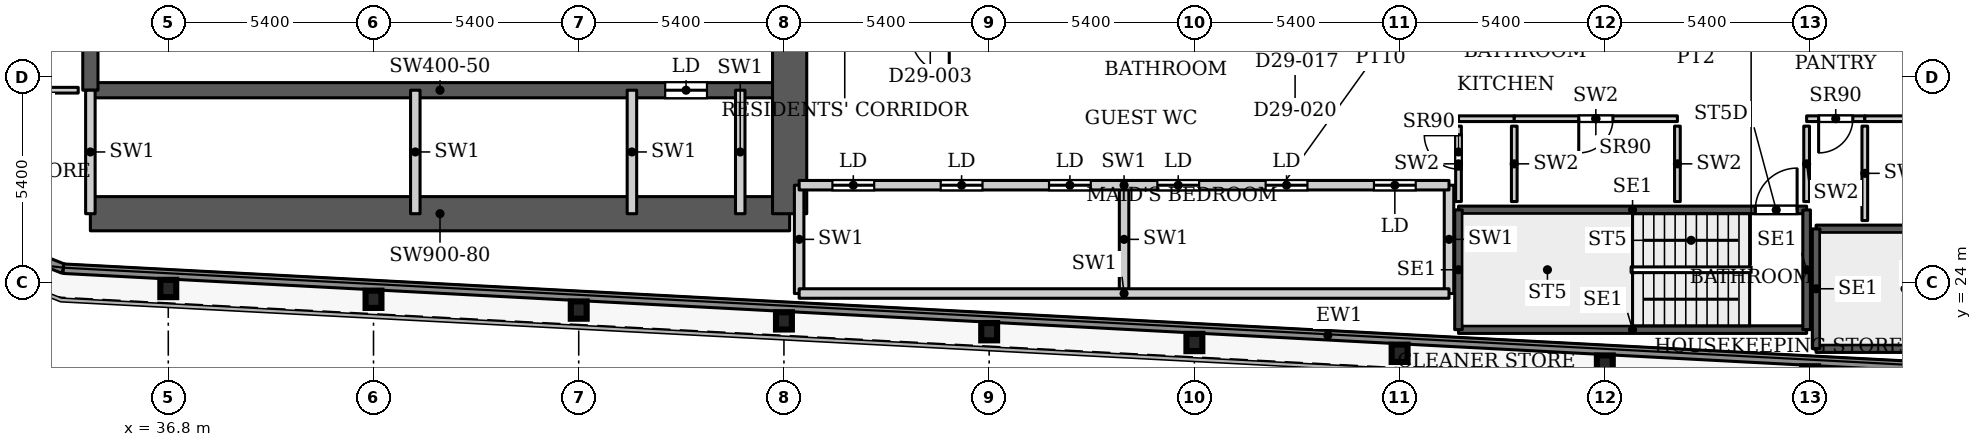
"""IFC4 building model, lengths in metres.
Left out: names, types, materials, properties, quantities, classifications, styles, units other than length and angle.
Written with IfcOpenShell. Run it as: python <this file> out.ifc"""

import sys

from ifc_helpers import new_model, si_unit, direction, frame, frame_2d, origin, origin_2d, place, context, subcontext, project, spatial, rectangle, i_section, extrude, source, transform, mapped, element, fill, save


model = new_model("IFC4")
c1 = context("Model", 3, precision=1e-05, world=origin(), true_north=direction((0.0, 1.0)))
c2 = subcontext(c1, "Body", "Model", "MODEL_VIEW")
j1 = project(units=[si_unit("LENGTHUNIT", "METRE"), si_unit("PLANEANGLEUNIT", "RADIAN")], contexts=[c1])
p1 = place(None, origin())
s1 = spatial("IfcSite", under=j1, at=p1, CompositionType="ELEMENT")
p2 = place(p1, origin())
s2 = spatial("IfcBuilding", under=s1, at=p2, CompositionType="ELEMENT")
p3 = place(p2, frame((0.0, 0.0, 129.2)))
s3 = spatial("IfcBuildingStorey", under=s2, at=p3, CompositionType="ELEMENT", Elevation=129.2)
for number, where, z_axis, x_axis in (
    (1, (80.0, 21.558, 0.0), (0.0, 0.0, 1.0), (1.0, 0.0, 0.0)),
    (2, (74.6, 21.843, 0.0), (0.0, 0.0, 1.0), (1.0, 0.0, 0.0)),
    (3, (69.2, 22.127, 0.0), (0.0, 0.0, 1.0), (1.0, 0.0, 0.0)),
    (4, (63.8, 22.411, 0.0), (0.0, 0.0, 1.0), (1.0, 0.0, 0.0)),
    (5, (58.4, 22.695, 0.0), (0.0, 0.0, 1.0), (1.0, 0.0, 0.0)),
    (6, (53.0, 22.98, 0.0), (0.0, 0.0, 1.0), (1.0, 0.0, 0.0)),
    (7, (47.6, 23.264, 0.0), (0.0, 0.0, 1.0), (1.0, 0.0, 0.0)),
    (8, (42.2, 23.548, 0.0), (0.0, 0.0, 1.0), (1.0, 0.0, 0.0)),
    (9, (36.8, 23.832, 0.0), (0.0, 0.0, 1.0), (1.0, 0.0, 0.0)),
):
    element("IfcColumn", number, at=place(p3, frame(where, z_axis=z_axis, x_axis=x_axis)), inside=s3, PredefinedType="COLUMN", context=c2, shape_type="SweptSolid", body=[
        extrude(i_section(OverallWidth=0.418, OverallDepth=0.455, WebThickness=0.042, FlangeThickness=0.068, FilletRadius=0.014, at=origin_2d()), origin(), (0.0, 0.0, 1.0), 3.9),
    ])
p4 = place(p3, frame((34.75, 25.8, 0.0), z_axis=(0.0, 0.0, 1.0), x_axis=(1.0, 0.0, 0.0)))
e10 = element("IfcWall", 10, at=p4, inside=s3, PredefinedType="SHEAR", context=c2, shape_type="SweptSolid", body=[
    extrude(rectangle(XDim=18.4, YDim=0.9, at=frame_2d((9.2, 0.0))), origin(), (0.0, 0.0, 1.0), 3.9),
])
p5 = place(p3, frame((34.75, 29.05, 0.0), z_axis=(0.0, 0.0, 1.0), x_axis=(1.0, 0.0, 0.0)))
e11 = element("IfcWall", 11, at=p5, inside=s3, PredefinedType="SHEAR", context=c2, shape_type="SweptSolid", body=[
    extrude(rectangle(XDim=18.4, YDim=0.4, at=frame_2d((9.2, 0.0))), origin(), (0.0, 0.0, 1.0), 3.9),
])
p6 = place(p5, frame((15.125, 0.0, 0.0)))
e12 = element("IfcOpeningElement", 12, at=p6, cuts=e11, PredefinedType="OPENING", context=c2, shape_type="SweptSolid", body=[
    extrude(rectangle(XDim=1.1, YDim=2.2, at=frame_2d((0.55, 1.1))), frame((0.0, 0.21, 0.0), z_axis=(0.0, -1.0, 0.0), x_axis=(1.0, 0.0, 0.0)), (0.0, 0.0, 1.0), 0.42),
])
p7 = place(p3, frame((34.75, 29.05, 0.0), z_axis=(0.0, 0.0, 1.0), x_axis=(0.0, 1.0, 0.0)))
e13 = element("IfcWall", 13, at=p7, inside=s3, PredefinedType="SHEAR", context=c2, shape_type="SweptSolid", body=[
    extrude(rectangle(XDim=18.45, YDim=0.4, at=frame_2d((9.225, 0.0))), origin(), (0.0, 0.0, 1.0), 3.9),
])
p8 = place(p7, frame((8.025, 0.0, 0.0)))
e14 = element("IfcOpeningElement", 14, at=p8, cuts=e13, PredefinedType="OPENING", context=c2, shape_type="SweptSolid", body=[
    extrude(rectangle(XDim=1.1, YDim=2.2, at=frame_2d((0.55, 1.1))), frame((0.0, 0.21, 0.0), z_axis=(0.0, -1.0, 0.0), x_axis=(1.0, 0.0, 0.0)), (0.0, 0.0, 1.0), 0.42),
])
p9 = place(p7, frame((10.875, 0.0, 0.0)))
e15 = element("IfcOpeningElement", 15, at=p9, cuts=e13, PredefinedType="OPENING", context=c2, shape_type="SweptSolid", body=[
    extrude(rectangle(XDim=1.1, YDim=2.2, at=frame_2d((0.55, 1.1))), frame((0.0, 0.21, 0.0), z_axis=(0.0, -1.0, 0.0), x_axis=(1.0, 0.0, 0.0)), (0.0, 0.0, 1.0), 0.42),
])
p10 = place(p7, frame((13.725, 0.0, 0.0)))
e16 = element("IfcOpeningElement", 16, at=p10, cuts=e13, PredefinedType="OPENING", context=c2, shape_type="SweptSolid", body=[
    extrude(rectangle(XDim=1.1, YDim=2.2, at=frame_2d((0.55, 1.1))), frame((0.0, 0.21, 0.0), z_axis=(0.0, -1.0, 0.0), x_axis=(1.0, 0.0, 0.0)), (0.0, 0.0, 1.0), 0.42),
])
p11 = place(p7, frame((15.95, 0.0, 0.0)))
e17 = element("IfcOpeningElement", 17, at=p11, cuts=e13, PredefinedType="OPENING", context=c2, shape_type="SweptSolid", body=[
    extrude(rectangle(XDim=1.1, YDim=2.2, at=frame_2d((0.55, 1.1))), frame((0.0, 0.21, 0.0), z_axis=(0.0, -1.0, 0.0), x_axis=(1.0, 0.0, 0.0)), (0.0, 0.0, 1.0), 0.42),
])
p12 = place(p3, frame((53.15, 25.8, 0.0), z_axis=(0.0, 0.0, 1.0), x_axis=(0.0, 1.0, 0.0)))
e18 = element("IfcWall", 18, at=p12, inside=s3, PredefinedType="SHEAR", context=c2, shape_type="SweptSolid", body=[
    extrude(rectangle(XDim=10.4, YDim=0.9, at=frame_2d((5.2, 0.0))), origin(), (0.0, 0.0, 1.0), 3.9),
])
p13 = place(p3, frame((34.039, 24.353, 0.0), z_axis=(0.0, 0.0, 1.0), x_axis=(-0.929352825399, 0.369192803184, 0.0)))
e19 = element("IfcWall", 19, at=p13, inside=s3, PredefinedType="SOLIDWALL", context=c2, shape_type="SweptSolid", body=[
    extrude(rectangle(XDim=4.656, YDim=0.25, at=frame_2d((2.328, 0.0))), origin(), (0.0, 0.0, 1.0), 3.75),
])
p14 = place(p3, frame((100.586, 20.85, 0.0), z_axis=(0.0, 0.0, 1.0), x_axis=(-0.99861746497, 0.052565755559, 0.0)))
e20 = element("IfcWall", 20, at=p14, inside=s3, PredefinedType="SOLIDWALL", context=c2, shape_type="SweptSolid", body=[
    extrude(rectangle(XDim=66.639, YDim=0.25, at=frame_2d((33.319, 0.0))), origin(), (0.0, 0.0, 1.0), 3.75),
])
p15 = place(p3, frame((80.16, 22.25, 0.0), z_axis=(0.0, 0.0, 1.0), x_axis=(1.0, 0.0, 0.0)))
e21 = element("IfcWall", 21, at=p15, inside=s3, PredefinedType="SHEAR", context=c2, shape_type="SweptSolid", body=[
    extrude(rectangle(XDim=9.16, YDim=0.2, at=frame_2d((4.58, 0.0))), origin(), (0.0, 0.0, 1.0), 3.9),
])
p16 = place(p3, frame((80.16, 25.4, 0.0), z_axis=(0.0, 0.0, 1.0), x_axis=(1.0, 0.0, 0.0)))
e22 = element("IfcWall", 22, at=p16, inside=s3, PredefinedType="SHEAR", context=c2, shape_type="SweptSolid", body=[
    extrude(rectangle(XDim=9.16, YDim=0.2, at=frame_2d((4.58, 0.0))), origin(), (0.0, 0.0, 1.0), 3.9),
])
p17 = place(p16, frame((7.81, 0.0, 0.0)))
e23 = element("IfcOpeningElement", 23, at=p17, cuts=e22, PredefinedType="OPENING", context=c2, shape_type="SweptSolid", body=[
    extrude(rectangle(XDim=1.1, YDim=2.2, at=frame_2d((0.55, 1.1))), frame((0.0, 0.11, 0.0), z_axis=(0.0, -1.0, 0.0), x_axis=(1.0, 0.0, 0.0)), (0.0, 0.0, 1.0), 0.22),
])
p18 = place(p3, frame((80.16, 22.25, 0.0), z_axis=(0.0, 0.0, 1.0), x_axis=(0.0, 1.0, 0.0)))
e24 = element("IfcWall", 24, at=p18, inside=s3, PredefinedType="SHEAR", context=c2, shape_type="SweptSolid", body=[
    extrude(rectangle(XDim=3.15, YDim=0.2, at=frame_2d((1.575, 0.0))), origin(), (0.0, 0.0, 1.0), 3.9),
])
p19 = place(p3, frame((70.75, 22.75, 0.0), z_axis=(0.0, 0.0, 1.0), x_axis=(1.0, 0.0, 0.0)))
e25 = element("IfcWall", 25, at=p19, inside=s3, PredefinedType="SHEAR", context=c2, shape_type="SweptSolid", body=[
    extrude(rectangle(XDim=9.16, YDim=0.2, at=frame_2d((4.58, 0.0))), origin(), (0.0, 0.0, 1.0), 3.9),
])
p20 = place(p3, frame((70.75, 25.9, 0.0), z_axis=(0.0, 0.0, 1.0), x_axis=(1.0, 0.0, 0.0)))
e26 = element("IfcWall", 26, at=p20, inside=s3, PredefinedType="SHEAR", context=c2, shape_type="SweptSolid", body=[
    extrude(rectangle(XDim=9.16, YDim=0.2, at=frame_2d((4.58, 0.0))), origin(), (0.0, 0.0, 1.0), 3.9),
])
p21 = place(p20, frame((7.81, 0.0, 0.0)))
e27 = element("IfcOpeningElement", 27, at=p21, cuts=e26, PredefinedType="OPENING", context=c2, shape_type="SweptSolid", body=[
    extrude(rectangle(XDim=1.1, YDim=2.2, at=frame_2d((0.55, 1.1))), frame((0.0, 0.11, 0.0), z_axis=(0.0, -1.0, 0.0), x_axis=(1.0, 0.0, 0.0)), (0.0, 0.0, 1.0), 0.22),
])
for number, where, z_axis, x_axis in (
    (28, (70.75, 22.75, 0.0), (0.0, 0.0, 1.0), (0.0, 1.0, 0.0)),
    (29, (79.91, 22.75, 0.0), (0.0, 0.0, 1.0), (0.0, 1.0, 0.0)),
):
    element("IfcWall", number, at=place(p3, frame(where, z_axis=z_axis, x_axis=x_axis)), inside=s3, PredefinedType="SHEAR", context=c2, shape_type="SweptSolid", body=[
        extrude(rectangle(XDim=3.15, YDim=0.2, at=frame_2d((1.575, 0.0))), origin(), (0.0, 0.0, 1.0), 3.9),
    ])
for number, where, z_axis, x_axis in (
    (30, (34.75, 25.8, 0.0), (0.0, 0.0, 1.0), (0.0, 1.0, 0.0)),
    (31, (43.3, 25.8, 0.0), (0.0, 0.0, 1.0), (0.0, 1.0, 0.0)),
    (32, (49.0, 25.8, 0.0), (0.0, 0.0, 1.0), (0.0, 1.0, 0.0)),
    (33, (51.85, 25.8, 0.0), (0.0, 0.0, 1.0), (0.0, 1.0, 0.0)),
):
    element("IfcWall", number, at=place(p3, frame(where, z_axis=z_axis, x_axis=x_axis)), inside=s3, PredefinedType="PARTITIONING", context=c2, shape_type="SweptSolid", body=[
        extrude(rectangle(XDim=3.25, YDim=0.25, at=frame_2d((1.625, 0.0))), origin(), (0.0, 0.0, 1.0), 3.9),
    ])
for number, where, z_axis, x_axis in (
    (34, (53.4, 23.7, 0.0), (0.0, 0.0, 1.0), (0.0, 1.0, 0.0)),
    (35, (61.95, 23.7, 0.0), (0.0, 0.0, 1.0), (0.0, 1.0, 0.0)),
    (36, (70.5, 23.7, 0.0), (0.0, 0.0, 1.0), (0.0, 1.0, 0.0)),
):
    element("IfcWall", number, at=place(p3, frame(where, z_axis=z_axis, x_axis=x_axis)), inside=s3, PredefinedType="PARTITIONING", context=c2, shape_type="SweptSolid", body=[
        extrude(rectangle(XDim=2.85, YDim=0.25, at=frame_2d((1.425, 0.0))), origin(), (0.0, 0.0, 1.0), 3.9),
    ])
p22 = place(p3, frame((53.4, 23.7, 0.0), z_axis=(0.0, 0.0, 1.0), x_axis=(1.0, 0.0, 0.0)))
e37 = element("IfcWall", 37, at=p22, inside=s3, PredefinedType="PARTITIONING", context=c2, shape_type="SweptSolid", body=[
    extrude(rectangle(XDim=17.1, YDim=0.25, at=frame_2d((8.55, 0.0))), origin(), (0.0, 0.0, 1.0), 3.9),
])
p23 = place(p3, frame((53.4, 26.55, 0.0), z_axis=(0.0, 0.0, 1.0), x_axis=(1.0, 0.0, 0.0)))
e38 = element("IfcWall", 38, at=p23, inside=s3, PredefinedType="PARTITIONING", context=c2, shape_type="SweptSolid", body=[
    extrude(rectangle(XDim=17.1, YDim=0.25, at=frame_2d((8.55, 0.0))), origin(), (0.0, 0.0, 1.0), 3.9),
])
p24 = place(p23, frame((0.875, 0.0, 0.0)))
e39 = element("IfcOpeningElement", 39, at=p24, cuts=e38, PredefinedType="OPENING", context=c2, shape_type="SweptSolid", body=[
    extrude(rectangle(XDim=1.1, YDim=2.2, at=frame_2d((0.55, 1.1))), frame((0.0, 0.135, 0.0), z_axis=(0.0, -1.0, 0.0), x_axis=(1.0, 0.0, 0.0)), (0.0, 0.0, 1.0), 0.27),
])
p25 = place(p23, frame((3.725, 0.0, 0.0)))
e40 = element("IfcOpeningElement", 40, at=p25, cuts=e38, PredefinedType="OPENING", context=c2, shape_type="SweptSolid", body=[
    extrude(rectangle(XDim=1.1, YDim=2.2, at=frame_2d((0.55, 1.1))), frame((0.0, 0.135, 0.0), z_axis=(0.0, -1.0, 0.0), x_axis=(1.0, 0.0, 0.0)), (0.0, 0.0, 1.0), 0.27),
])
p26 = place(p23, frame((6.575, 0.0, 0.0)))
e41 = element("IfcOpeningElement", 41, at=p26, cuts=e38, PredefinedType="OPENING", context=c2, shape_type="SweptSolid", body=[
    extrude(rectangle(XDim=1.1, YDim=2.2, at=frame_2d((0.55, 1.1))), frame((0.0, 0.135, 0.0), z_axis=(0.0, -1.0, 0.0), x_axis=(1.0, 0.0, 0.0)), (0.0, 0.0, 1.0), 0.27),
])
p27 = place(p23, frame((9.425, 0.0, 0.0)))
e42 = element("IfcOpeningElement", 42, at=p27, cuts=e38, PredefinedType="OPENING", context=c2, shape_type="SweptSolid", body=[
    extrude(rectangle(XDim=1.1, YDim=2.2, at=frame_2d((0.55, 1.1))), frame((0.0, 0.135, 0.0), z_axis=(0.0, -1.0, 0.0), x_axis=(1.0, 0.0, 0.0)), (0.0, 0.0, 1.0), 0.27),
])
p28 = place(p23, frame((12.275, 0.0, 0.0)))
e43 = element("IfcOpeningElement", 43, at=p28, cuts=e38, PredefinedType="OPENING", context=c2, shape_type="SweptSolid", body=[
    extrude(rectangle(XDim=1.1, YDim=2.2, at=frame_2d((0.55, 1.1))), frame((0.0, 0.135, 0.0), z_axis=(0.0, -1.0, 0.0), x_axis=(1.0, 0.0, 0.0)), (0.0, 0.0, 1.0), 0.27),
])
p29 = place(p23, frame((15.125, 0.0, 0.0)))
e44 = element("IfcOpeningElement", 44, at=p29, cuts=e38, PredefinedType="OPENING", context=c2, shape_type="SweptSolid", body=[
    extrude(rectangle(XDim=1.1, YDim=2.2, at=frame_2d((0.55, 1.1))), frame((0.0, 0.135, 0.0), z_axis=(0.0, -1.0, 0.0), x_axis=(1.0, 0.0, 0.0)), (0.0, 0.0, 1.0), 0.27),
])
p30 = place(p3, frame((31.07, 29.05, 0.0), z_axis=(0.0, 0.0, 1.0), x_axis=(1.0, 0.0, 0.0)))
e45 = element("IfcWall", 45, at=p30, inside=s3, PredefinedType="PARTITIONING", context=c2, shape_type="SweptSolid", body=[
    extrude(rectangle(XDim=3.36, YDim=0.15, at=frame_2d((1.68, 0.0))), origin(), (0.0, 0.0, 1.0), 3.9),
])
p31 = place(p30, frame((1.105, 0.0, 0.0)))
e46 = element("IfcOpeningElement", 46, at=p31, cuts=e45, PredefinedType="OPENING", context=c2, shape_type="SweptSolid", body=[
    extrude(rectangle(XDim=0.9, YDim=2.2, at=frame_2d((0.45, 1.1))), frame((0.0, 0.085, 0.0), z_axis=(0.0, -1.0, 0.0), x_axis=(1.0, 0.0, 0.0)), (0.0, 0.0, 1.0), 0.17),
])
p32 = place(p3, frame((70.75, 28.3, 0.0), z_axis=(0.0, 0.0, 1.0), x_axis=(1.0, 0.0, 0.0)))
e47 = element("IfcWall", 47, at=p32, inside=s3, PredefinedType="PARTITIONING", context=c2, shape_type="SweptSolid", body=[
    extrude(rectangle(XDim=1.467, YDim=0.15, at=frame_2d((0.733, 0.0))), origin(), (0.0, 0.0, 1.0), 3.9),
])
p33 = place(p3, frame((70.75, 26.12, 0.0), z_axis=(0.0, 0.0, 1.0), x_axis=(0.0, 1.0, 0.0)))
e48 = element("IfcWall", 48, at=p33, inside=s3, PredefinedType="PARTITIONING", context=c2, shape_type="SweptSolid", body=[
    extrude(rectangle(XDim=1.985, YDim=0.15, at=frame_2d((0.992, 0.0))), origin(), (0.0, 0.0, 1.0), 3.9),
])
p34 = place(p33, frame((0.855, 0.0, 0.0)))
e49 = element("IfcOpeningElement", 49, at=p34, cuts=e48, PredefinedType="OPENING", context=c2, shape_type="SweptSolid", body=[
    extrude(rectangle(XDim=0.9, YDim=2.2, at=frame_2d((0.45, 1.1))), frame((0.0, 0.085, 0.0), z_axis=(0.0, -1.0, 0.0), x_axis=(1.0, 0.0, 0.0)), (0.0, 0.0, 1.0), 0.17),
])
p35 = place(p3, frame((72.217, 26.12, 0.0), z_axis=(0.0, 0.0, 1.0), x_axis=(0.0, 1.0, 0.0)))
e50 = element("IfcWall", 50, at=p35, inside=s3, PredefinedType="PARTITIONING", context=c2, shape_type="SweptSolid", body=[
    extrude(rectangle(XDim=1.985, YDim=0.15, at=frame_2d((0.992, 0.0))), origin(), (0.0, 0.0, 1.0), 3.9),
])
p36 = place(p3, frame((72.217, 28.3, 0.0), z_axis=(0.0, 0.0, 1.0), x_axis=(1.0, 0.0, 0.0)))
e51 = element("IfcWall", 51, at=p36, inside=s3, PredefinedType="PARTITIONING", context=c2, shape_type="SweptSolid", body=[
    extrude(rectangle(XDim=4.293, YDim=0.15, at=frame_2d((2.146, 0.0))), origin(), (0.0, 0.0, 1.0), 3.9),
])
p37 = place(p36, frame((1.697, 0.0, 0.0)))
e52 = element("IfcOpeningElement", 52, at=p37, cuts=e51, PredefinedType="OPENING", context=c2, shape_type="SweptSolid", body=[
    extrude(rectangle(XDim=0.9, YDim=2.2, at=frame_2d((0.45, 1.1))), frame((0.0, 0.085, 0.0), z_axis=(0.0, -1.0, 0.0), x_axis=(1.0, 0.0, 0.0)), (0.0, 0.0, 1.0), 0.17),
])
p38 = place(p3, frame((76.51, 26.12, 0.0), z_axis=(0.0, 0.0, 1.0), x_axis=(0.0, 1.0, 0.0)))
e53 = element("IfcWall", 53, at=p38, inside=s3, PredefinedType="PARTITIONING", context=c2, shape_type="SweptSolid", body=[
    extrude(rectangle(XDim=1.985, YDim=0.15, at=frame_2d((0.992, 0.0))), origin(), (0.0, 0.0, 1.0), 3.9),
])
p39 = place(p3, frame((79.91, 28.3, 0.0), z_axis=(0.0, 0.0, 1.0), x_axis=(1.0, 0.0, 0.0)))
e54 = element("IfcWall", 54, at=p39, inside=s3, PredefinedType="PARTITIONING", context=c2, shape_type="SweptSolid", body=[
    extrude(rectangle(XDim=1.531, YDim=0.15, at=frame_2d((0.766, 0.0))), origin(), (0.0, 0.0, 1.0), 3.9),
])
p40 = place(p39, frame((0.316, 0.0, 0.0)))
e55 = element("IfcOpeningElement", 55, at=p40, cuts=e54, PredefinedType="OPENING", context=c2, shape_type="SweptSolid", body=[
    extrude(rectangle(XDim=0.9, YDim=2.2, at=frame_2d((0.45, 1.1))), frame((0.0, 0.085, 0.0), z_axis=(0.0, -1.0, 0.0), x_axis=(1.0, 0.0, 0.0)), (0.0, 0.0, 1.0), 0.17),
])
p41 = place(p3, frame((79.91, 26.12, 0.0), z_axis=(0.0, 0.0, 1.0), x_axis=(0.0, 1.0, 0.0)))
e56 = element("IfcWall", 56, at=p41, inside=s3, PredefinedType="PARTITIONING", context=c2, shape_type="SweptSolid", body=[
    extrude(rectangle(XDim=1.985, YDim=0.15, at=frame_2d((0.992, 0.0))), origin(), (0.0, 0.0, 1.0), 3.9),
])
p42 = place(p3, frame((81.441, 25.62, 0.0), z_axis=(0.0, 0.0, 1.0), x_axis=(0.0, 1.0, 0.0)))
e57 = element("IfcWall", 57, at=p42, inside=s3, PredefinedType="PARTITIONING", context=c2, shape_type="SweptSolid", body=[
    extrude(rectangle(XDim=2.485, YDim=0.15, at=frame_2d((1.242, 0.0))), origin(), (0.0, 0.0, 1.0), 3.9),
])
p43 = place(p3, frame((81.441, 28.3, 0.0), z_axis=(0.0, 0.0, 1.0), x_axis=(1.0, 0.0, 0.0)))
e58 = element("IfcWall", 58, at=p43, inside=s3, PredefinedType="PARTITIONING", context=c2, shape_type="SweptSolid", body=[
    extrude(rectangle(XDim=4.479, YDim=0.15, at=frame_2d((2.24, 0.0))), origin(), (0.0, 0.0, 1.0), 3.9),
])
p44 = place(p43, frame((1.789, 0.0, 0.0)))
e59 = element("IfcOpeningElement", 59, at=p44, cuts=e58, PredefinedType="OPENING", context=c2, shape_type="SweptSolid", body=[
    extrude(rectangle(XDim=0.9, YDim=2.2, at=frame_2d((0.45, 1.1))), frame((0.0, 0.085, 0.0), z_axis=(0.0, -1.0, 0.0), x_axis=(1.0, 0.0, 0.0)), (0.0, 0.0, 1.0), 0.17),
])
m1 = source(origin(), c2, "Body", "SweptSolid", [
    extrude(rectangle(XDim=1.1, YDim=2.2, at=frame_2d((0.55, 1.1))), frame((0.0, 0.025, 0.0), z_axis=(0.0, -1.0, 0.0), x_axis=(1.0, 0.0, 0.0)), (0.0, 0.0, 1.0), 0.05),
])
p45 = place(p24, origin())
e60 = element("IfcDoor", 60, at=p45, inside=s3, OperationType="SLIDING_TO_LEFT", PredefinedType="DOOR", context=c2, shape_type="MappedRepresentation", body=[
    mapped(m1, transform((0.0, 0.0, 0.0), x_axis=(1.0, 0.0, 0.0), y_axis=(0.0, 1.0, 0.0), z_axis=(0.0, 0.0, 1.0), scale=1.0)),
])
fill(e39, e60)
p46 = place(p25, origin())
e61 = element("IfcDoor", 61, at=p46, inside=s3, OperationType="SLIDING_TO_LEFT", PredefinedType="DOOR", context=c2, shape_type="MappedRepresentation", body=[
    mapped(m1, transform((0.0, 0.0, 0.0), x_axis=(1.0, 0.0, 0.0), y_axis=(0.0, 1.0, 0.0), z_axis=(0.0, 0.0, 1.0), scale=1.0)),
])
fill(e40, e61)
p47 = place(p26, origin())
e62 = element("IfcDoor", 62, at=p47, inside=s3, OperationType="SLIDING_TO_LEFT", PredefinedType="DOOR", context=c2, shape_type="MappedRepresentation", body=[
    mapped(m1, transform((0.0, 0.0, 0.0), x_axis=(1.0, 0.0, 0.0), y_axis=(0.0, 1.0, 0.0), z_axis=(0.0, 0.0, 1.0), scale=1.0)),
])
fill(e41, e62)
p48 = place(p27, origin())
e63 = element("IfcDoor", 63, at=p48, inside=s3, OperationType="SLIDING_TO_LEFT", PredefinedType="DOOR", context=c2, shape_type="MappedRepresentation", body=[
    mapped(m1, transform((0.0, 0.0, 0.0), x_axis=(1.0, 0.0, 0.0), y_axis=(0.0, 1.0, 0.0), z_axis=(0.0, 0.0, 1.0), scale=1.0)),
])
fill(e42, e63)
p49 = place(p28, origin())
e64 = element("IfcDoor", 64, at=p49, inside=s3, OperationType="SLIDING_TO_LEFT", PredefinedType="DOOR", context=c2, shape_type="MappedRepresentation", body=[
    mapped(m1, transform((0.0, 0.0, 0.0), x_axis=(1.0, 0.0, 0.0), y_axis=(0.0, 1.0, 0.0), z_axis=(0.0, 0.0, 1.0), scale=1.0)),
])
fill(e43, e64)
p50 = place(p29, origin())
e65 = element("IfcDoor", 65, at=p50, inside=s3, OperationType="SLIDING_TO_LEFT", PredefinedType="DOOR", context=c2, shape_type="MappedRepresentation", body=[
    mapped(m1, transform((0.0, 0.0, 0.0), x_axis=(1.0, 0.0, 0.0), y_axis=(0.0, 1.0, 0.0), z_axis=(0.0, 0.0, 1.0), scale=1.0)),
])
fill(e44, e65)
p51 = place(p6, origin())
e66 = element("IfcDoor", 66, at=p51, inside=s3, OperationType="SLIDING_TO_LEFT", PredefinedType="DOOR", context=c2, shape_type="MappedRepresentation", body=[
    mapped(m1, transform((0.0, 0.0, 0.0), x_axis=(1.0, 0.0, 0.0), y_axis=(0.0, 1.0, 0.0), z_axis=(0.0, 0.0, 1.0), scale=1.0)),
])
fill(e12, e66)
m2 = source(origin(), c2, "Body", "SweptSolid", [
    extrude(rectangle(XDim=0.9, YDim=2.2, at=frame_2d((0.45, 1.1))), frame((0.0, 0.025, 0.0), z_axis=(0.0, -1.0, 0.0), x_axis=(1.0, 0.0, 0.0)), (0.0, 0.0, 1.0), 0.05),
])
p52 = place(p34, origin())
e67 = element("IfcDoor", 67, at=p52, inside=s3, OperationType="SINGLE_SWING_LEFT", PredefinedType="DOOR", context=c2, shape_type="MappedRepresentation", body=[
    mapped(m2, transform((0.0, 0.0, 0.0), x_axis=(1.0, 0.0, 0.0), y_axis=(0.0, 1.0, 0.0), z_axis=(0.0, 0.0, 1.0), scale=1.0)),
])
fill(e49, e67)
p53 = place(p37, origin())
e68 = element("IfcDoor", 68, at=p53, inside=s3, OperationType="SINGLE_SWING_RIGHT", PredefinedType="DOOR", context=c2, shape_type="MappedRepresentation", body=[
    mapped(m2, transform((0.0, 0.0, 0.0), x_axis=(1.0, 0.0, 0.0), y_axis=(0.0, 1.0, 0.0), z_axis=(0.0, 0.0, 1.0), scale=1.0)),
])
fill(e52, e68)
p54 = place(p40, origin())
e69 = element("IfcDoor", 69, at=p54, inside=s3, OperationType="SINGLE_SWING_RIGHT", PredefinedType="DOOR", context=c2, shape_type="MappedRepresentation", body=[
    mapped(m2, transform((0.0, 0.0, 0.0), x_axis=(1.0, 0.0, 0.0), y_axis=(0.0, 1.0, 0.0), z_axis=(0.0, 0.0, 1.0), scale=1.0)),
])
fill(e55, e69)
m3 = source(origin(), c2, "Body", "SweptSolid", [
    extrude(rectangle(XDim=1.1, YDim=2.2, at=frame_2d((0.55, 1.1))), frame((0.0, 0.025, 0.0), z_axis=(0.0, -1.0, 0.0), x_axis=(1.0, 0.0, 0.0)), (0.0, 0.0, 1.0), 0.05),
])
p55 = place(p21, origin())
e70 = element("IfcDoor", 70, at=p55, inside=s3, OperationType="SINGLE_SWING_LEFT", PredefinedType="DOOR", context=c2, shape_type="MappedRepresentation", body=[
    mapped(m3, transform((0.0, 0.0, 0.0), x_axis=(1.0, 0.0, 0.0), y_axis=(0.0, 1.0, 0.0), z_axis=(0.0, 0.0, 1.0), scale=1.0)),
])
fill(e27, e70)
save(model, sys.argv[1])
